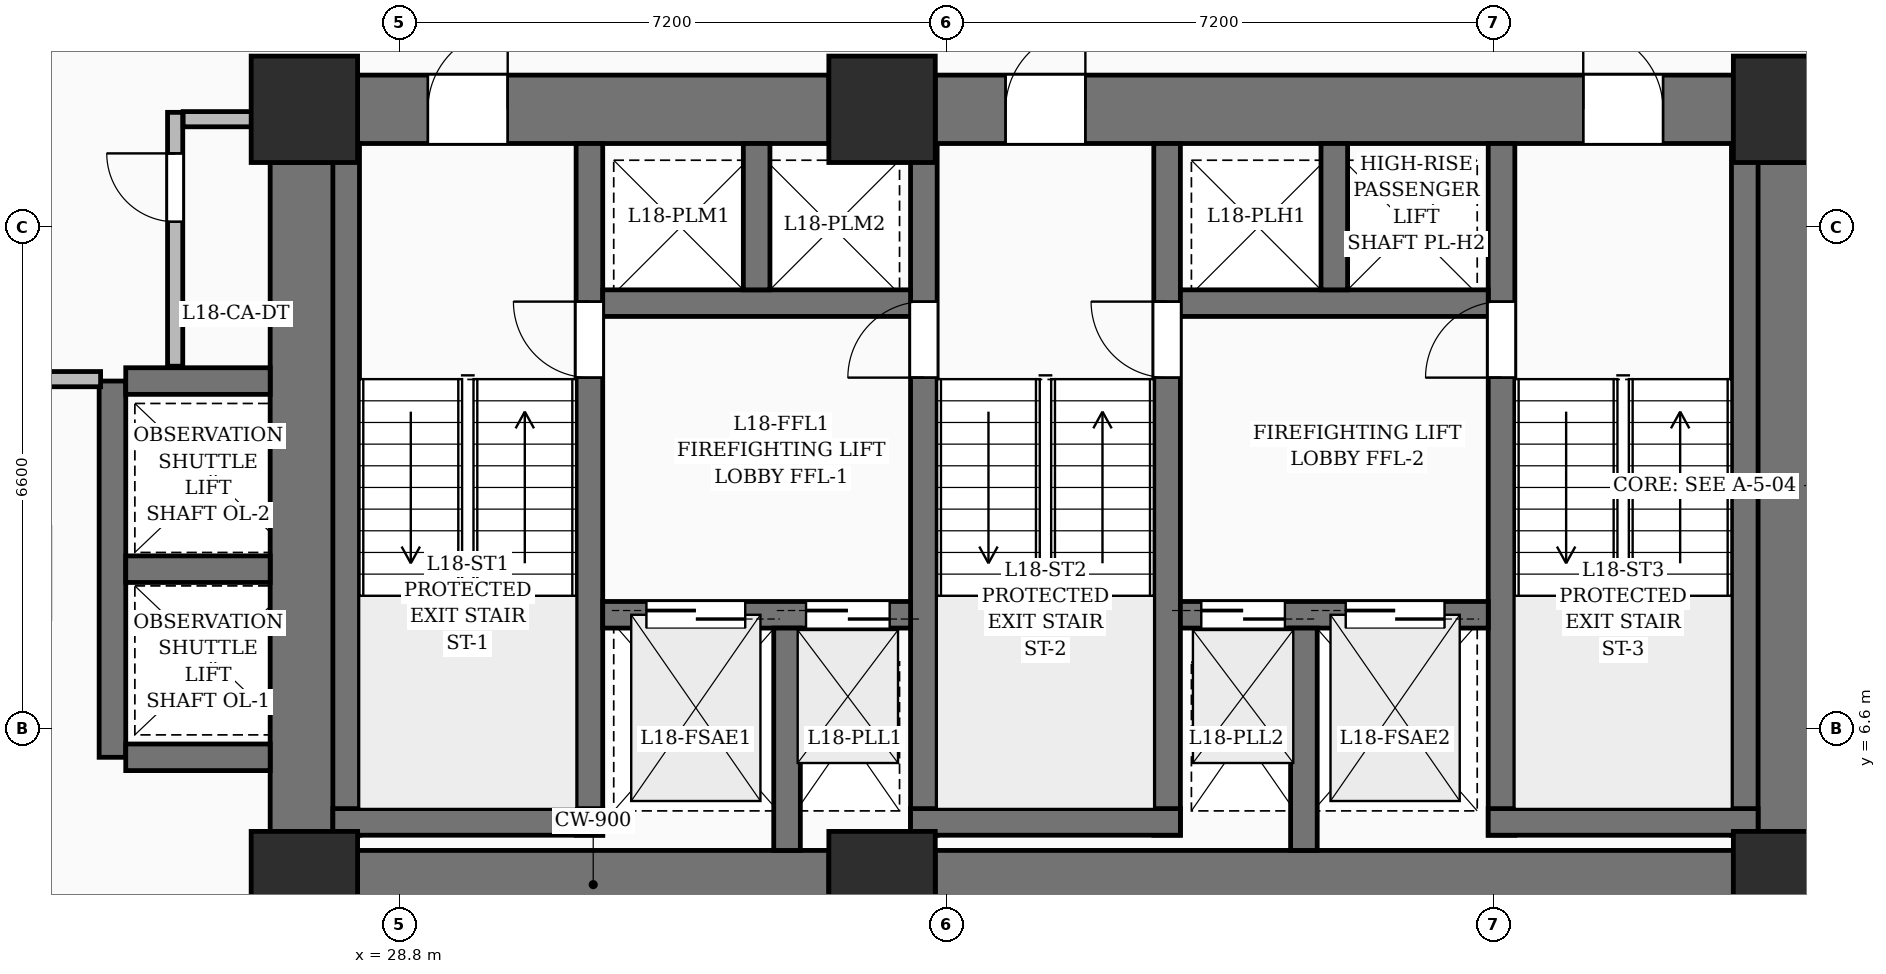
"""IFC4 building model, lengths in metres.
Left out: names, types, materials, properties, quantities, classifications, styles, units other than length and angle.
Written with IfcOpenShell. Run it as: python <this file> out.ifc"""

import sys

from ifc_helpers import new_model, si_unit, direction, frame, frame_2d, origin, origin_2d, place, context, subcontext, project, spatial, rectangle, extrude, element, fill, save


model = new_model("IFC4")
c1 = context("Model", 3, precision=1e-05, world=origin(), true_north=direction((0.0, 1.0)))
c2 = subcontext(c1, "Body", "Model", "MODEL_VIEW")
j1 = project(units=[si_unit("LENGTHUNIT", "METRE"), si_unit("PLANEANGLEUNIT", "RADIAN")], contexts=[c1])
p1 = place(None, origin())
s1 = spatial("IfcSite", under=j1, at=p1, CompositionType="ELEMENT")
p2 = place(p1, origin())
s2 = spatial("IfcBuilding", under=s1, at=p2, CompositionType="ELEMENT")
p3 = place(p2, frame((0.0, 0.0, 75.0)))
s3 = spatial("IfcBuildingStorey", under=s2, at=p3, CompositionType="ELEMENT", Elevation=75.0)
for number, where, z_axis, x_axis in (
    (1, (27.55, 4.55, 0.0), (0.0, 0.0, 1.0), (1.0, 0.0, 0.0)),
    (2, (35.15, 4.55, 0.0), (0.0, 0.0, 1.0), (1.0, 0.0, 0.0)),
    (3, (47.05, 4.55, 0.0), (0.0, 0.0, 1.0), (1.0, 0.0, 0.0)),
    (4, (27.55, 14.75, 0.0), (0.0, 0.0, 1.0), (1.0, 0.0, 0.0)),
    (5, (35.15, 14.75, 0.0), (0.0, 0.0, 1.0), (1.0, 0.0, 0.0)),
    (6, (47.05, 14.75, 0.0), (0.0, 0.0, 1.0), (1.0, 0.0, 0.0)),
):
    element("IfcColumn", number, at=place(p3, frame(where, z_axis=z_axis, x_axis=x_axis)), inside=s3, PredefinedType="COLUMN", context=c2, shape_type="SweptSolid", body=[
        extrude(rectangle(XDim=1.4, YDim=1.4, at=origin_2d()), origin(), (0.0, 0.0, 1.0), 3.6),
    ])
p4 = place(p3, frame((28.25, 4.55, 0.0), z_axis=(0.0, 0.0, 1.0), x_axis=(1.0, 0.0, 0.0)))
e7 = element("IfcWall", 7, at=p4, inside=s3, PredefinedType="SHEAR", context=c2, shape_type="SweptSolid", body=[
    extrude(rectangle(XDim=6.2, YDim=0.9, at=frame_2d((3.1, 0.0))), origin(), (0.0, 0.0, 1.0), 3.6),
])
p5 = place(p3, frame((35.85, 4.55, 0.0), z_axis=(0.0, 0.0, 1.0), x_axis=(1.0, 0.0, 0.0)))
e8 = element("IfcWall", 8, at=p5, inside=s3, PredefinedType="SHEAR", context=c2, shape_type="SweptSolid", body=[
    extrude(rectangle(XDim=10.5, YDim=0.9, at=frame_2d((5.25, 0.0))), origin(), (0.0, 0.0, 1.0), 3.6),
])
p6 = place(p3, frame((28.25, 14.75, 0.0), z_axis=(0.0, 0.0, 1.0), x_axis=(1.0, 0.0, 0.0)))
e9 = element("IfcWall", 9, at=p6, inside=s3, PredefinedType="SHEAR", context=c2, shape_type="SweptSolid", body=[
    extrude(rectangle(XDim=6.2, YDim=0.9, at=frame_2d((3.1, 0.0))), origin(), (0.0, 0.0, 1.0), 3.6),
])
p7 = place(p6, frame((0.925, 0.0, 0.0)))
e10 = element("IfcOpeningElement", 10, at=p7, cuts=e9, PredefinedType="OPENING", context=c2, shape_type="SweptSolid", body=[
    extrude(rectangle(XDim=1.05, YDim=2.15, at=frame_2d((0.525, 1.075))), frame((0.0, 0.46, 0.0), z_axis=(0.0, -1.0, 0.0), x_axis=(1.0, 0.0, 0.0)), (0.0, 0.0, 1.0), 0.92),
])
p8 = place(p3, frame((35.85, 14.75, 0.0), z_axis=(0.0, 0.0, 1.0), x_axis=(1.0, 0.0, 0.0)))
e11 = element("IfcWall", 11, at=p8, inside=s3, PredefinedType="SHEAR", context=c2, shape_type="SweptSolid", body=[
    extrude(rectangle(XDim=10.5, YDim=0.9, at=frame_2d((5.25, 0.0))), origin(), (0.0, 0.0, 1.0), 3.6),
])
p9 = place(p8, frame((0.925, 0.0, 0.0)))
e12 = element("IfcOpeningElement", 12, at=p9, cuts=e11, PredefinedType="OPENING", context=c2, shape_type="SweptSolid", body=[
    extrude(rectangle(XDim=1.05, YDim=2.15, at=frame_2d((0.525, 1.075))), frame((0.0, 0.46, 0.0), z_axis=(0.0, -1.0, 0.0), x_axis=(1.0, 0.0, 0.0)), (0.0, 0.0, 1.0), 0.92),
])
p10 = place(p8, frame((8.525, 0.0, 0.0)))
e13 = element("IfcOpeningElement", 13, at=p10, cuts=e11, PredefinedType="OPENING", context=c2, shape_type="SweptSolid", body=[
    extrude(rectangle(XDim=1.05, YDim=2.15, at=frame_2d((0.525, 1.075))), frame((0.0, 0.46, 0.0), z_axis=(0.0, -1.0, 0.0), x_axis=(1.0, 0.0, 0.0)), (0.0, 0.0, 1.0), 0.92),
])
for number, where, z_axis, x_axis in (
    (14, (27.55, 5.25, 0.0), (0.0, 0.0, 1.0), (0.0, 1.0, 0.0)),
    (15, (47.05, 5.25, 0.0), (0.0, 0.0, 1.0), (0.0, 1.0, 0.0)),
):
    element("IfcWall", number, at=place(p3, frame(where, z_axis=z_axis, x_axis=x_axis)), inside=s3, PredefinedType="SHEAR", context=c2, shape_type="SweptSolid", body=[
        extrude(rectangle(XDim=8.8, YDim=0.9, at=frame_2d((4.4, 0.0))), origin(), (0.0, 0.0, 1.0), 3.6),
    ])
p11 = place(p3, frame((28.1, 5.2, 0.0), z_axis=(0.0, 0.0, 1.0), x_axis=(0.0, 1.0, 0.0)))
e16 = element("IfcWall", 16, at=p11, inside=s3, PredefinedType="SOLIDWALL", context=c2, shape_type="SweptSolid", body=[
    extrude(rectangle(XDim=9.1, YDim=0.35, at=frame_2d((4.55, 0.0))), origin(), (0.0, 0.0, 1.0), 3.6),
])
p12 = place(p3, frame((31.3, 5.2, 0.0), z_axis=(0.0, 0.0, 1.0), x_axis=(0.0, 1.0, 0.0)))
e17 = element("IfcWall", 17, at=p12, inside=s3, PredefinedType="SOLIDWALL", context=c2, shape_type="SweptSolid", body=[
    extrude(rectangle(XDim=9.1, YDim=0.35, at=frame_2d((4.55, 0.0))), origin(), (0.0, 0.0, 1.0), 3.6),
])
p13 = place(p12, frame((6.02, 0.0, 0.0)))
e18 = element("IfcOpeningElement", 18, at=p13, cuts=e17, PredefinedType="OPENING", context=c2, shape_type="SweptSolid", body=[
    extrude(rectangle(XDim=1.0, YDim=2.15, at=frame_2d((0.5, 1.075))), frame((0.0, 0.185, 0.0), z_axis=(0.0, -1.0, 0.0), x_axis=(1.0, 0.0, 0.0)), (0.0, 0.0, 1.0), 0.37),
])
p14 = place(p3, frame((27.925, 5.375, 0.0), z_axis=(0.0, 0.0, 1.0), x_axis=(1.0, 0.0, 0.0)))
e19 = element("IfcWall", 19, at=p14, inside=s3, PredefinedType="SOLIDWALL", context=c2, shape_type="SweptSolid", body=[
    extrude(rectangle(XDim=3.55, YDim=0.35, at=frame_2d((1.775, 0.0))), origin(), (0.0, 0.0, 1.0), 3.6),
])
p15 = place(p3, frame((35.7, 5.2, 0.0), z_axis=(0.0, 0.0, 1.0), x_axis=(0.0, 1.0, 0.0)))
e20 = element("IfcWall", 20, at=p15, inside=s3, PredefinedType="SOLIDWALL", context=c2, shape_type="SweptSolid", body=[
    extrude(rectangle(XDim=9.1, YDim=0.35, at=frame_2d((4.55, 0.0))), origin(), (0.0, 0.0, 1.0), 3.6),
])
p16 = place(p15, frame((6.02, 0.0, 0.0)))
e21 = element("IfcOpeningElement", 21, at=p16, cuts=e20, PredefinedType="OPENING", context=c2, shape_type="SweptSolid", body=[
    extrude(rectangle(XDim=1.0, YDim=2.15, at=frame_2d((0.5, 1.075))), frame((0.0, 0.185, 0.0), z_axis=(0.0, -1.0, 0.0), x_axis=(1.0, 0.0, 0.0)), (0.0, 0.0, 1.0), 0.37),
])
p17 = place(p3, frame((38.9, 5.2, 0.0), z_axis=(0.0, 0.0, 1.0), x_axis=(0.0, 1.0, 0.0)))
e22 = element("IfcWall", 22, at=p17, inside=s3, PredefinedType="SOLIDWALL", context=c2, shape_type="SweptSolid", body=[
    extrude(rectangle(XDim=9.1, YDim=0.35, at=frame_2d((4.55, 0.0))), origin(), (0.0, 0.0, 1.0), 3.6),
])
p18 = place(p17, frame((6.02, 0.0, 0.0)))
e23 = element("IfcOpeningElement", 23, at=p18, cuts=e22, PredefinedType="OPENING", context=c2, shape_type="SweptSolid", body=[
    extrude(rectangle(XDim=1.0, YDim=2.15, at=frame_2d((0.5, 1.075))), frame((0.0, 0.185, 0.0), z_axis=(0.0, -1.0, 0.0), x_axis=(1.0, 0.0, 0.0)), (0.0, 0.0, 1.0), 0.37),
])
p19 = place(p3, frame((35.525, 5.375, 0.0), z_axis=(0.0, 0.0, 1.0), x_axis=(1.0, 0.0, 0.0)))
e24 = element("IfcWall", 24, at=p19, inside=s3, PredefinedType="SOLIDWALL", context=c2, shape_type="SweptSolid", body=[
    extrude(rectangle(XDim=3.55, YDim=0.35, at=frame_2d((1.775, 0.0))), origin(), (0.0, 0.0, 1.0), 3.6),
])
p20 = place(p3, frame((43.3, 5.2, 0.0), z_axis=(0.0, 0.0, 1.0), x_axis=(0.0, 1.0, 0.0)))
e25 = element("IfcWall", 25, at=p20, inside=s3, PredefinedType="SOLIDWALL", context=c2, shape_type="SweptSolid", body=[
    extrude(rectangle(XDim=9.1, YDim=0.35, at=frame_2d((4.55, 0.0))), origin(), (0.0, 0.0, 1.0), 3.6),
])
p21 = place(p20, frame((6.02, 0.0, 0.0)))
e26 = element("IfcOpeningElement", 26, at=p21, cuts=e25, PredefinedType="OPENING", context=c2, shape_type="SweptSolid", body=[
    extrude(rectangle(XDim=1.0, YDim=2.15, at=frame_2d((0.5, 1.075))), frame((0.0, 0.185, 0.0), z_axis=(0.0, -1.0, 0.0), x_axis=(1.0, 0.0, 0.0)), (0.0, 0.0, 1.0), 0.37),
])
p22 = place(p3, frame((46.5, 5.2, 0.0), z_axis=(0.0, 0.0, 1.0), x_axis=(0.0, 1.0, 0.0)))
e27 = element("IfcWall", 27, at=p22, inside=s3, PredefinedType="SOLIDWALL", context=c2, shape_type="SweptSolid", body=[
    extrude(rectangle(XDim=9.1, YDim=0.35, at=frame_2d((4.55, 0.0))), origin(), (0.0, 0.0, 1.0), 3.6),
])
p23 = place(p3, frame((43.125, 5.375, 0.0), z_axis=(0.0, 0.0, 1.0), x_axis=(1.0, 0.0, 0.0)))
e28 = element("IfcWall", 28, at=p23, inside=s3, PredefinedType="SOLIDWALL", context=c2, shape_type="SweptSolid", body=[
    extrude(rectangle(XDim=3.55, YDim=0.35, at=frame_2d((1.775, 0.0))), origin(), (0.0, 0.0, 1.0), 3.6),
])
p24 = place(p3, frame((31.475, 8.1, 0.0), z_axis=(0.0, 0.0, 1.0), x_axis=(1.0, 0.0, 0.0)))
e29 = element("IfcWall", 29, at=p24, inside=s3, PredefinedType="SOLIDWALL", context=c2, shape_type="SweptSolid", body=[
    extrude(rectangle(XDim=4.05, YDim=0.35, at=frame_2d((2.025, 0.0))), origin(), (0.0, 0.0, 1.0), 3.6),
])
p25 = place(p24, frame((0.575, 0.0, 0.0)))
e30 = element("IfcOpeningElement", 30, at=p25, cuts=e29, PredefinedType="OPENING", context=c2, shape_type="SweptSolid", body=[
    extrude(rectangle(XDim=1.3, YDim=2.25, at=frame_2d((0.65, 1.125))), frame((0.0, 0.185, 0.0), z_axis=(0.0, -1.0, 0.0), x_axis=(1.0, 0.0, 0.0)), (0.0, 0.0, 1.0), 0.37),
])
p26 = place(p24, frame((2.675, 0.0, 0.0)))
e31 = element("IfcOpeningElement", 31, at=p26, cuts=e29, PredefinedType="OPENING", context=c2, shape_type="SweptSolid", body=[
    extrude(rectangle(XDim=1.1, YDim=2.2, at=frame_2d((0.55, 1.1))), frame((0.0, 0.185, 0.0), z_axis=(0.0, -1.0, 0.0), x_axis=(1.0, 0.0, 0.0)), (0.0, 0.0, 1.0), 0.37),
])
p27 = place(p3, frame((39.075, 8.1, 0.0), z_axis=(0.0, 0.0, 1.0), x_axis=(1.0, 0.0, 0.0)))
e32 = element("IfcWall", 32, at=p27, inside=s3, PredefinedType="SOLIDWALL", context=c2, shape_type="SweptSolid", body=[
    extrude(rectangle(XDim=4.05, YDim=0.35, at=frame_2d((2.025, 0.0))), origin(), (0.0, 0.0, 1.0), 3.6),
])
p28 = place(p27, frame((2.175, 0.0, 0.0)))
e33 = element("IfcOpeningElement", 33, at=p28, cuts=e32, PredefinedType="OPENING", context=c2, shape_type="SweptSolid", body=[
    extrude(rectangle(XDim=1.3, YDim=2.25, at=frame_2d((0.65, 1.125))), frame((0.0, 0.185, 0.0), z_axis=(0.0, -1.0, 0.0), x_axis=(1.0, 0.0, 0.0)), (0.0, 0.0, 1.0), 0.37),
])
p29 = place(p27, frame((0.275, 0.0, 0.0)))
e34 = element("IfcOpeningElement", 34, at=p29, cuts=e32, PredefinedType="OPENING", context=c2, shape_type="SweptSolid", body=[
    extrude(rectangle(XDim=1.1, YDim=2.2, at=frame_2d((0.55, 1.1))), frame((0.0, 0.185, 0.0), z_axis=(0.0, -1.0, 0.0), x_axis=(1.0, 0.0, 0.0)), (0.0, 0.0, 1.0), 0.37),
])
for number, where, z_axis, x_axis in (
    (35, (33.9, 5.0, 0.0), (0.0, 0.0, 1.0), (0.0, 1.0, 0.0)),
    (36, (40.7, 5.0, 0.0), (0.0, 0.0, 1.0), (0.0, 1.0, 0.0)),
):
    element("IfcWall", number, at=place(p3, frame(where, z_axis=z_axis, x_axis=x_axis)), inside=s3, PredefinedType="SOLIDWALL", context=c2, shape_type="SweptSolid", body=[
        extrude(rectangle(XDim=2.925, YDim=0.35, at=frame_2d((1.462, 0.0))), origin(), (0.0, 0.0, 1.0), 3.6),
    ])
p30 = place(p3, frame((31.475, 12.2, 0.0), z_axis=(0.0, 0.0, 1.0), x_axis=(1.0, 0.0, 0.0)))
e37 = element("IfcWall", 37, at=p30, inside=s3, PredefinedType="SOLIDWALL", context=c2, shape_type="SweptSolid", body=[
    extrude(rectangle(XDim=4.05, YDim=0.35, at=frame_2d((2.025, 0.0))), origin(), (0.0, 0.0, 1.0), 3.6),
])
p31 = place(p3, frame((33.5, 12.375, 0.0), z_axis=(0.0, 0.0, 1.0), x_axis=(0.0, 1.0, 0.0)))
e38 = element("IfcWall", 38, at=p31, inside=s3, PredefinedType="SOLIDWALL", context=c2, shape_type="SweptSolid", body=[
    extrude(rectangle(XDim=1.925, YDim=0.35, at=frame_2d((0.962, 0.0))), origin(), (0.0, 0.0, 1.0), 3.6),
])
p32 = place(p3, frame((39.075, 12.2, 0.0), z_axis=(0.0, 0.0, 1.0), x_axis=(1.0, 0.0, 0.0)))
e39 = element("IfcWall", 39, at=p32, inside=s3, PredefinedType="SOLIDWALL", context=c2, shape_type="SweptSolid", body=[
    extrude(rectangle(XDim=4.05, YDim=0.35, at=frame_2d((2.025, 0.0))), origin(), (0.0, 0.0, 1.0), 3.6),
])
p33 = place(p3, frame((41.1, 12.375, 0.0), z_axis=(0.0, 0.0, 1.0), x_axis=(0.0, 1.0, 0.0)))
e40 = element("IfcWall", 40, at=p33, inside=s3, PredefinedType="SOLIDWALL", context=c2, shape_type="SweptSolid", body=[
    extrude(rectangle(XDim=1.925, YDim=0.35, at=frame_2d((0.962, 0.0))), origin(), (0.0, 0.0, 1.0), 3.6),
])
p34 = place(p3, frame((25.025, 6.225, 0.0), z_axis=(0.0, 0.0, 1.0), x_axis=(0.0, 1.0, 0.0)))
e41 = element("IfcWall", 41, at=p34, inside=s3, PredefinedType="SOLIDWALL", context=c2, shape_type="SweptSolid", body=[
    extrude(rectangle(XDim=4.95, YDim=0.35, at=frame_2d((2.475, 0.0))), origin(), (0.0, 0.0, 1.0), 3.6),
])
for number, where, z_axis, x_axis in (
    (42, (25.2, 6.225, 0.0), (0.0, 0.0, 1.0), (1.0, 0.0, 0.0)),
    (43, (25.2, 8.7, 0.0), (0.0, 0.0, 1.0), (1.0, 0.0, 0.0)),
    (44, (25.2, 11.175, 0.0), (0.0, 0.0, 1.0), (1.0, 0.0, 0.0)),
):
    element("IfcWall", number, at=place(p3, frame(where, z_axis=z_axis, x_axis=x_axis)), inside=s3, PredefinedType="SOLIDWALL", context=c2, shape_type="SweptSolid", body=[
        extrude(rectangle(XDim=1.9, YDim=0.35, at=frame_2d((0.95, 0.0))), origin(), (0.0, 0.0, 1.0), 3.6),
    ])
p35 = place(p3, frame((25.85, 11.37, 0.0), z_axis=(0.0, 0.0, 1.0), x_axis=(0.0, 1.0, 0.0)))
e45 = element("IfcWall", 45, at=p35, inside=s3, PredefinedType="PARTITIONING", context=c2, shape_type="SweptSolid", body=[
    extrude(rectangle(XDim=3.34, YDim=0.2, at=frame_2d((1.67, 0.0))), origin(), (0.0, 0.0, 1.0), 3.35),
])
p36 = place(p35, frame((1.9, 0.0, 0.0)))
e46 = element("IfcOpeningElement", 46, at=p36, cuts=e45, PredefinedType="OPENING", context=c2, shape_type="SweptSolid", body=[
    extrude(rectangle(XDim=0.9, YDim=2.1, at=frame_2d((0.45, 1.05))), frame((0.0, 0.11, 0.0), z_axis=(0.0, -1.0, 0.0), x_axis=(1.0, 0.0, 0.0)), (0.0, 0.0, 1.0), 0.22),
])
p37 = place(p3, frame((25.955, 14.62, 0.0), z_axis=(0.0, 0.0, 1.0), x_axis=(1.0, 0.0, 0.0)))
e47 = element("IfcWall", 47, at=p37, inside=s3, PredefinedType="PARTITIONING", context=c2, shape_type="SweptSolid", body=[
    extrude(rectangle(XDim=1.13, YDim=0.2, at=frame_2d((0.565, 0.0))), origin(), (0.0, 0.0, 1.0), 3.35),
])
p38 = place(p3, frame((21.485, 11.2, 0.0), z_axis=(0.0, 0.0, 1.0), x_axis=(1.0, 0.0, 0.0)))
e48 = element("IfcWall", 48, at=p38, inside=s3, PredefinedType="PARTITIONING", context=c2, shape_type="SweptSolid", body=[
    extrude(rectangle(XDim=3.384, YDim=0.2, at=frame_2d((1.692, 0.0))), origin(), (0.0, 0.0, 1.0), 3.35),
])
p39 = place(p38, frame((0.905, 0.0, 0.0)))
e49 = element("IfcOpeningElement", 49, at=p39, cuts=e48, PredefinedType="OPENING", context=c2, shape_type="SweptSolid", body=[
    extrude(rectangle(XDim=1.6, YDim=2.3, at=frame_2d((0.8, 1.15))), frame((0.0, 0.11, 0.0), z_axis=(0.0, -1.0, 0.0), x_axis=(1.0, 0.0, 0.0)), (0.0, 0.0, 1.0), 0.22),
])
p40 = place(p7, origin())
e50 = element("IfcDoor", 50, at=p40, inside=s3, OperationType="SINGLE_SWING_RIGHT", PredefinedType="DOOR", context=c2, shape_type="SweptSolid", body=[
    extrude(rectangle(XDim=1.05, YDim=2.15, at=frame_2d((0.525, 1.075))), frame((0.0, 0.025, 0.0), z_axis=(0.0, -1.0, 0.0), x_axis=(1.0, 0.0, 0.0)), (0.0, 0.0, 1.0), 0.05),
])
fill(e10, e50)
p41 = place(p9, origin())
e51 = element("IfcDoor", 51, at=p41, inside=s3, OperationType="SINGLE_SWING_RIGHT", PredefinedType="DOOR", context=c2, shape_type="SweptSolid", body=[
    extrude(rectangle(XDim=1.05, YDim=2.15, at=frame_2d((0.525, 1.075))), frame((0.0, 0.025, 0.0), z_axis=(0.0, -1.0, 0.0), x_axis=(1.0, 0.0, 0.0)), (0.0, 0.0, 1.0), 0.05),
])
fill(e12, e51)
p42 = place(p10, origin())
e52 = element("IfcDoor", 52, at=p42, inside=s3, OperationType="SINGLE_SWING_LEFT", PredefinedType="DOOR", context=c2, shape_type="SweptSolid", body=[
    extrude(rectangle(XDim=1.05, YDim=2.15, at=frame_2d((0.525, 1.075))), frame((0.0, 0.025, 0.0), z_axis=(0.0, -1.0, 0.0), x_axis=(1.0, 0.0, 0.0)), (0.0, 0.0, 1.0), 0.05),
])
fill(e13, e52)
p43 = place(p13, origin())
e53 = element("IfcDoor", 53, at=p43, inside=s3, OperationType="SINGLE_SWING_RIGHT", PredefinedType="DOOR", context=c2, shape_type="SweptSolid", body=[
    extrude(rectangle(XDim=1.0, YDim=2.15, at=frame_2d((0.5, 1.075))), frame((0.0, 0.025, 0.0), z_axis=(0.0, -1.0, 0.0), x_axis=(1.0, 0.0, 0.0)), (0.0, 0.0, 1.0), 0.05),
])
fill(e18, e53)
p44 = place(p16, origin())
e54 = element("IfcDoor", 54, at=p44, inside=s3, OperationType="SINGLE_SWING_LEFT", PredefinedType="DOOR", context=c2, shape_type="SweptSolid", body=[
    extrude(rectangle(XDim=1.0, YDim=2.15, at=frame_2d((0.5, 1.075))), frame((0.0, 0.025, 0.0), z_axis=(0.0, -1.0, 0.0), x_axis=(1.0, 0.0, 0.0)), (0.0, 0.0, 1.0), 0.05),
])
fill(e21, e54)
p45 = place(p18, origin())
e55 = element("IfcDoor", 55, at=p45, inside=s3, OperationType="SINGLE_SWING_RIGHT", PredefinedType="DOOR", context=c2, shape_type="SweptSolid", body=[
    extrude(rectangle(XDim=1.0, YDim=2.15, at=frame_2d((0.5, 1.075))), frame((0.0, 0.025, 0.0), z_axis=(0.0, -1.0, 0.0), x_axis=(1.0, 0.0, 0.0)), (0.0, 0.0, 1.0), 0.05),
])
fill(e23, e55)
p46 = place(p21, origin())
e56 = element("IfcDoor", 56, at=p46, inside=s3, OperationType="SINGLE_SWING_LEFT", PredefinedType="DOOR", context=c2, shape_type="SweptSolid", body=[
    extrude(rectangle(XDim=1.0, YDim=2.15, at=frame_2d((0.5, 1.075))), frame((0.0, 0.025, 0.0), z_axis=(0.0, -1.0, 0.0), x_axis=(1.0, 0.0, 0.0)), (0.0, 0.0, 1.0), 0.05),
])
fill(e26, e56)
p47 = place(p25, origin())
e57 = element("IfcDoor", 57, at=p47, inside=s3, OperationType="DOUBLE_DOOR_SLIDING", PredefinedType="DOOR", context=c2, shape_type="SweptSolid", body=[
    extrude(rectangle(XDim=1.3, YDim=2.25, at=frame_2d((0.65, 1.125))), frame((0.0, 0.025, 0.0), z_axis=(0.0, -1.0, 0.0), x_axis=(1.0, 0.0, 0.0)), (0.0, 0.0, 1.0), 0.05),
])
fill(e30, e57)
p48 = place(p28, origin())
e58 = element("IfcDoor", 58, at=p48, inside=s3, OperationType="DOUBLE_DOOR_SLIDING", PredefinedType="DOOR", context=c2, shape_type="SweptSolid", body=[
    extrude(rectangle(XDim=1.3, YDim=2.25, at=frame_2d((0.65, 1.125))), frame((0.0, 0.025, 0.0), z_axis=(0.0, -1.0, 0.0), x_axis=(1.0, 0.0, 0.0)), (0.0, 0.0, 1.0), 0.05),
])
fill(e33, e58)
p49 = place(p26, origin())
e59 = element("IfcDoor", 59, at=p49, inside=s3, OperationType="DOUBLE_DOOR_SLIDING", PredefinedType="DOOR", context=c2, shape_type="SweptSolid", body=[
    extrude(rectangle(XDim=1.1, YDim=2.2, at=frame_2d((0.55, 1.1))), frame((0.0, 0.025, 0.0), z_axis=(0.0, -1.0, 0.0), x_axis=(1.0, 0.0, 0.0)), (0.0, 0.0, 1.0), 0.05),
])
fill(e31, e59)
p50 = place(p29, origin())
e60 = element("IfcDoor", 60, at=p50, inside=s3, OperationType="DOUBLE_DOOR_SLIDING", PredefinedType="DOOR", context=c2, shape_type="SweptSolid", body=[
    extrude(rectangle(XDim=1.1, YDim=2.2, at=frame_2d((0.55, 1.1))), frame((0.0, 0.025, 0.0), z_axis=(0.0, -1.0, 0.0), x_axis=(1.0, 0.0, 0.0)), (0.0, 0.0, 1.0), 0.05),
])
fill(e34, e60)
p51 = place(p36, origin())
e61 = element("IfcDoor", 61, at=p51, inside=s3, OperationType="SINGLE_SWING_RIGHT", PredefinedType="DOOR", context=c2, shape_type="SweptSolid", body=[
    extrude(rectangle(XDim=0.9, YDim=2.1, at=frame_2d((0.45, 1.05))), frame((0.0, 0.025, 0.0), z_axis=(0.0, -1.0, 0.0), x_axis=(1.0, 0.0, 0.0)), (0.0, 0.0, 1.0), 0.05),
])
fill(e46, e61)
save(model, sys.argv[1])
